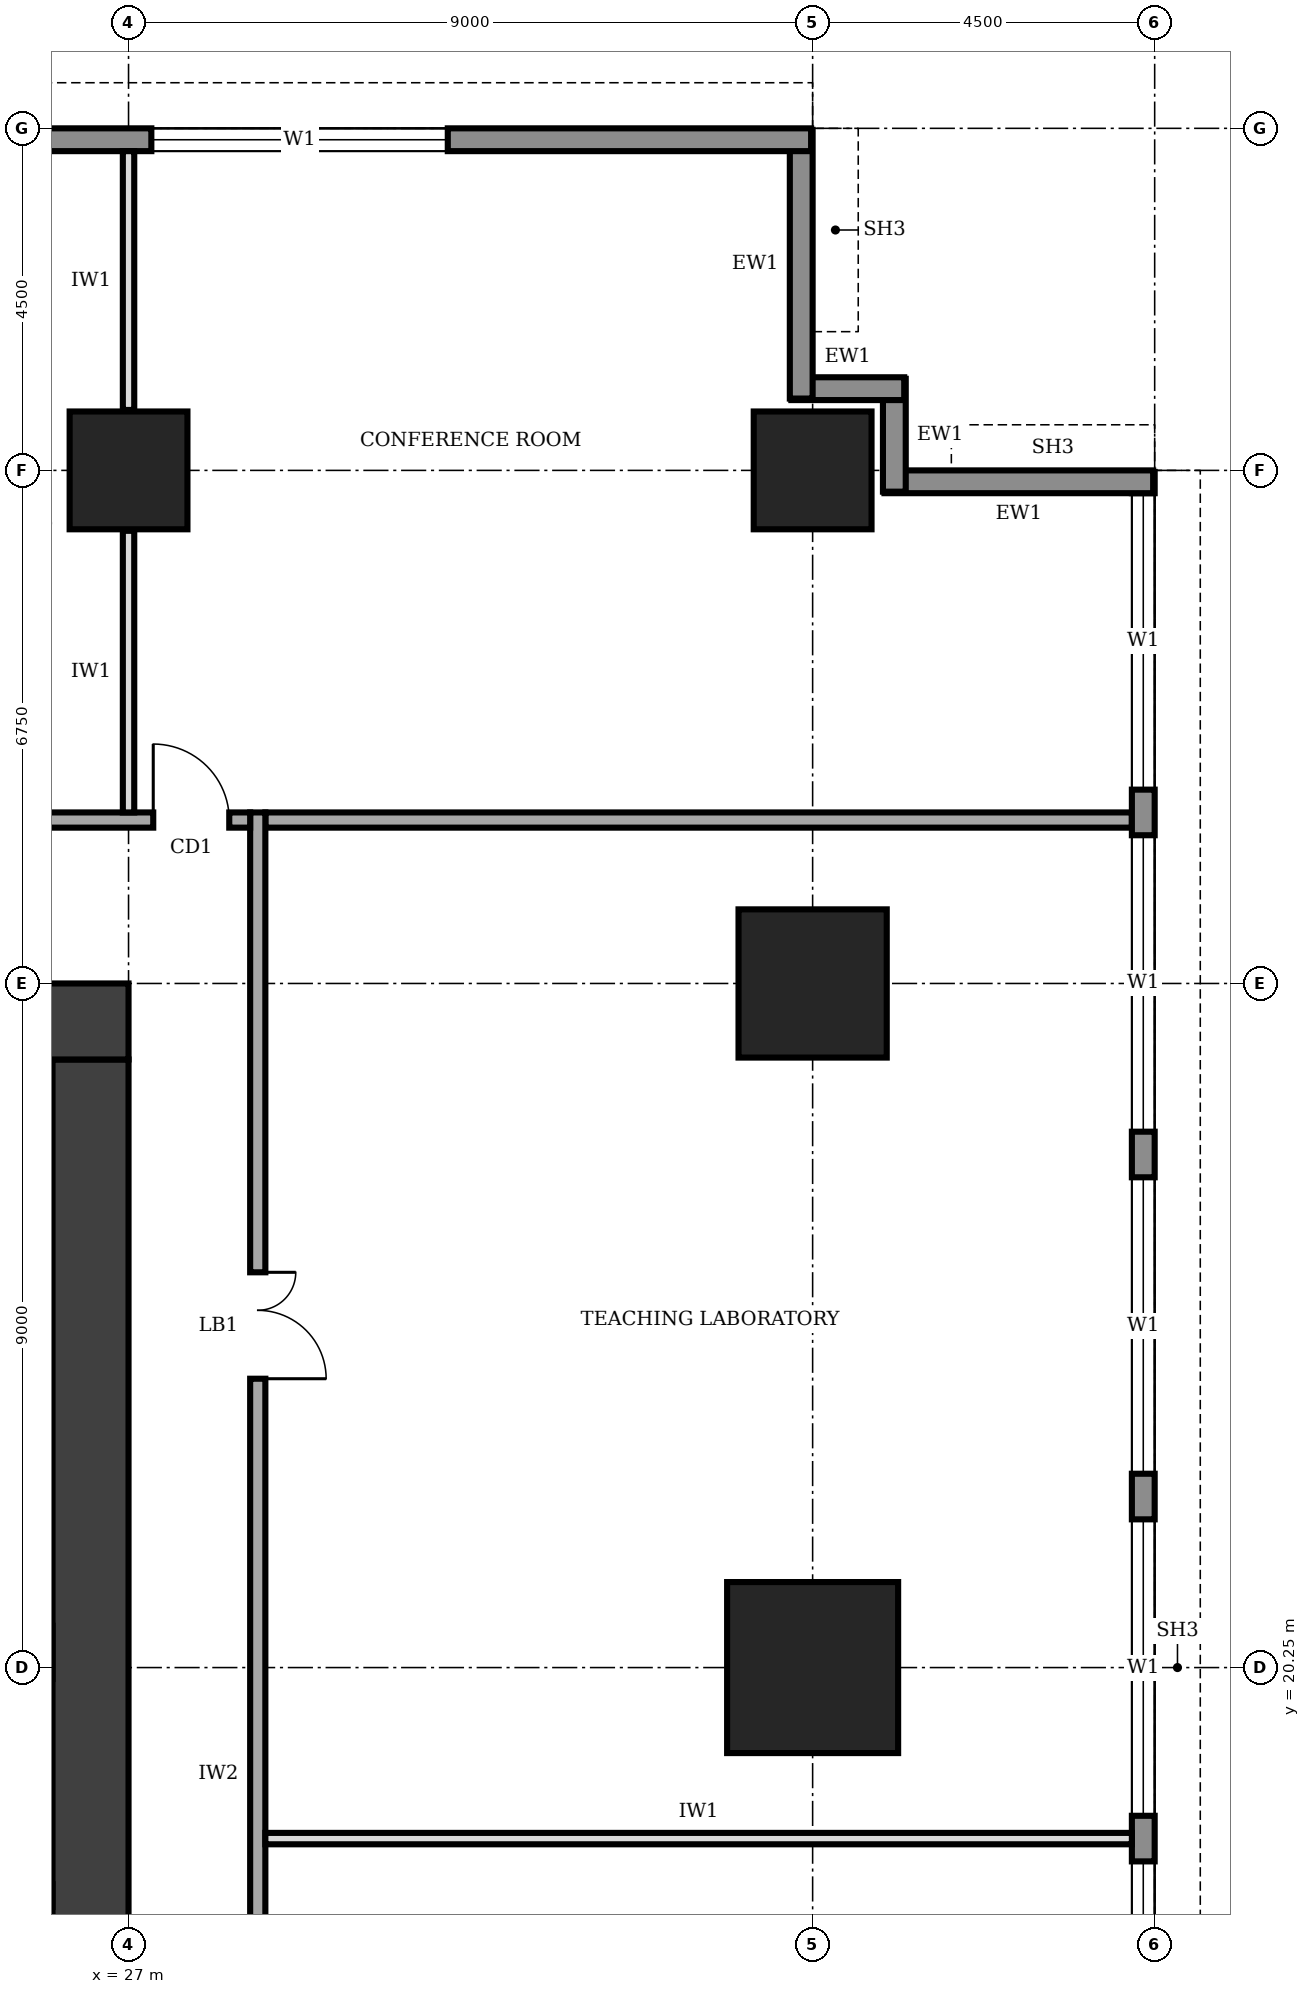
"""IFC4 building model, lengths in metres.
Left out: names, types, materials, properties, quantities, classifications, styles, units other than length and angle.
Written with IfcOpenShell. Run it as: python <this file> out.ifc"""

import sys

from ifc_helpers import new_model, si_unit, direction, frame, frame_2d, origin, origin_2d, place, context, subcontext, project, spatial, rectangle, extrude, element, fill, save


model = new_model("IFC4")
c1 = context("Model", 3, precision=1e-05, world=origin(), true_north=direction((0.0, 1.0)))
c2 = subcontext(c1, "Body", "Model", "MODEL_VIEW")
j1 = project(units=[si_unit("LENGTHUNIT", "METRE"), si_unit("PLANEANGLEUNIT", "RADIAN")], contexts=[c1])
p1 = place(None, origin())
s1 = spatial("IfcSite", under=j1, at=p1, CompositionType="ELEMENT")
p2 = place(p1, origin())
s2 = spatial("IfcBuilding", under=s1, at=p2, CompositionType="ELEMENT")
p3 = place(p2, frame((0.0, 0.0, 205.0)))
s3 = spatial("IfcBuildingStorey", under=s2, at=p3, CompositionType="ELEMENT", Elevation=205.0)
p4 = place(p3, frame((26.5, 12.25, 0.0), z_axis=(0.0, 0.0, 1.0), x_axis=(0.0, 1.0, 0.0)))
e1 = element("IfcWall", 1, at=p4, inside=s3, PredefinedType="SHEAR", context=c2, shape_type="SweptSolid", body=[
    extrude(rectangle(XDim=16.0, YDim=1.0, at=frame_2d((8.0, 0.0))), origin(), (0.0, 0.0, 1.0), 4.0),
])
p5 = place(p3, frame((27.0, 28.75, 0.0), z_axis=(0.0, 0.0, 1.0), x_axis=(-1.0, 0.0, 0.0)))
e2 = element("IfcWall", 2, at=p5, inside=s3, PredefinedType="SHEAR", context=c2, shape_type="SweptSolid", body=[
    extrude(rectangle(XDim=13.5, YDim=1.0, at=frame_2d((6.75, 0.0))), origin(), (0.0, 0.0, 1.0), 4.0),
])
p6 = place(p5, frame((4.75, 0.0, 0.0)))
e3 = element("IfcOpeningElement", 3, at=p6, cuts=e2, PredefinedType="OPENING", context=c2, shape_type="SweptSolid", body=[
    extrude(rectangle(XDim=1.8, YDim=2.1, at=frame_2d((0.9, 1.05))), frame((0.0, 0.51, 0.0), z_axis=(0.0, -1.0, 0.0), x_axis=(1.0, 0.0, 0.0)), (0.0, 0.0, 1.0), 1.02),
])
p7 = place(p3, frame((36.0, 20.25, 0.0), z_axis=(0.0, 0.0, 1.0), x_axis=(1.0, 0.0, 0.0)))
e4 = element("IfcColumn", 4, at=p7, inside=s3, PredefinedType="COLUMN", context=c2, shape_type="SweptSolid", body=[
    extrude(rectangle(XDim=2.25, YDim=2.25, at=origin_2d()), origin(), (0.0, 0.0, 1.0), 4.0),
])
p8 = place(p3, frame((36.0, 29.25, 0.0), z_axis=(0.0, 0.0, 1.0), x_axis=(1.0, 0.0, 0.0)))
e5 = element("IfcColumn", 5, at=p8, inside=s3, PredefinedType="COLUMN", context=c2, shape_type="SweptSolid", body=[
    extrude(rectangle(XDim=1.95, YDim=1.95, at=origin_2d()), origin(), (0.0, 0.0, 1.0), 4.0),
])
for number, where, z_axis, x_axis in (
    (6, (27.0, 36.0, 0.0), (0.0, 0.0, 1.0), (1.0, 0.0, 0.0)),
    (7, (36.0, 36.0, 0.0), (0.0, 0.0, 1.0), (1.0, 0.0, 0.0)),
):
    element("IfcColumn", number, at=place(p3, frame(where, z_axis=z_axis, x_axis=x_axis)), inside=s3, PredefinedType="COLUMN", context=c2, shape_type="SweptSolid", body=[
        extrude(rectangle(XDim=1.55, YDim=1.55, at=origin_2d()), origin(), (0.0, 0.0, 1.0), 4.0),
    ])
p9 = place(p3, frame((40.35, 4.52, 0.0), z_axis=(0.0, 0.0, 1.0), x_axis=(0.0, 1.0, 0.0)))
e8 = element("IfcWall", 8, at=p9, inside=s3, PredefinedType="STANDARD", context=c2, shape_type="SweptSolid", body=[
    extrude(rectangle(XDim=31.46, YDim=0.3, at=frame_2d((15.73, 0.0))), origin(), (0.0, 0.0, 1.0), 3.75),
])
p10 = place(p9, frame((4.78, 0.0, 0.9)))
e9 = element("IfcOpeningElement", 9, at=p10, cuts=e8, PredefinedType="OPENING", context=c2, shape_type="SweptSolid", body=[
    extrude(rectangle(XDim=3.9, YDim=2.2, at=frame_2d((1.95, 1.1))), frame((0.0, 0.16, 0.0), z_axis=(0.0, -1.0, 0.0), x_axis=(1.0, 0.0, 0.0)), (0.0, 0.0, 1.0), 0.32),
])
p11 = place(p9, frame((9.28, 0.0, 0.9)))
e10 = element("IfcOpeningElement", 10, at=p11, cuts=e8, PredefinedType="OPENING", context=c2, shape_type="SweptSolid", body=[
    extrude(rectangle(XDim=3.9, YDim=2.2, at=frame_2d((1.95, 1.1))), frame((0.0, 0.16, 0.0), z_axis=(0.0, -1.0, 0.0), x_axis=(1.0, 0.0, 0.0)), (0.0, 0.0, 1.0), 0.32),
])
p12 = place(p9, frame((13.78, 0.0, 0.9)))
e11 = element("IfcOpeningElement", 11, at=p12, cuts=e8, PredefinedType="OPENING", context=c2, shape_type="SweptSolid", body=[
    extrude(rectangle(XDim=3.9, YDim=2.2, at=frame_2d((1.95, 1.1))), frame((0.0, 0.16, 0.0), z_axis=(0.0, -1.0, 0.0), x_axis=(1.0, 0.0, 0.0)), (0.0, 0.0, 1.0), 0.32),
])
p13 = place(p9, frame((18.28, 0.0, 0.9)))
e12 = element("IfcOpeningElement", 12, at=p13, cuts=e8, PredefinedType="OPENING", context=c2, shape_type="SweptSolid", body=[
    extrude(rectangle(XDim=3.9, YDim=2.2, at=frame_2d((1.95, 1.1))), frame((0.0, 0.16, 0.0), z_axis=(0.0, -1.0, 0.0), x_axis=(1.0, 0.0, 0.0)), (0.0, 0.0, 1.0), 0.32),
])
p14 = place(p9, frame((22.78, 0.0, 0.9)))
e13 = element("IfcOpeningElement", 13, at=p14, cuts=e8, PredefinedType="OPENING", context=c2, shape_type="SweptSolid", body=[
    extrude(rectangle(XDim=3.9, YDim=2.2, at=frame_2d((1.95, 1.1))), frame((0.0, 0.16, 0.0), z_axis=(0.0, -1.0, 0.0), x_axis=(1.0, 0.0, 0.0)), (0.0, 0.0, 1.0), 0.32),
])
p15 = place(p9, frame((27.28, 0.0, 0.9)))
e14 = element("IfcOpeningElement", 14, at=p15, cuts=e8, PredefinedType="OPENING", context=c2, shape_type="SweptSolid", body=[
    extrude(rectangle(XDim=3.9, YDim=2.2, at=frame_2d((1.95, 1.1))), frame((0.0, 0.16, 0.0), z_axis=(0.0, -1.0, 0.0), x_axis=(1.0, 0.0, 0.0)), (0.0, 0.0, 1.0), 0.32),
])
p16 = place(p3, frame((40.48, 35.85, 0.0), z_axis=(0.0, 0.0, 1.0), x_axis=(-1.0, 0.0, 0.0)))
e15 = element("IfcWall", 15, at=p16, inside=s3, PredefinedType="STANDARD", context=c2, shape_type="SweptSolid", body=[
    extrude(rectangle(XDim=3.535, YDim=0.3, at=frame_2d((1.768, 0.0))), origin(), (0.0, 0.0, 1.0), 2.85),
])
for number, where, z_axis, x_axis in (
    (16, (37.075, 35.72, 0.0), (0.0, 0.0, 1.0), (0.0, 1.0, 0.0)),
    (17, (37.205, 37.075, 0.0), (0.0, 0.0, 1.0), (-1.0, 0.0, 0.0)),
):
    element("IfcWall", number, at=place(p3, frame(where, z_axis=z_axis, x_axis=x_axis)), inside=s3, PredefinedType="STANDARD", context=c2, shape_type="SweptSolid", body=[
        extrude(rectangle(XDim=1.485, YDim=0.3, at=frame_2d((0.743, 0.0))), origin(), (0.0, 0.0, 1.0), 3.75),
    ])
p17 = place(p3, frame((35.85, 36.945, 0.0), z_axis=(0.0, 0.0, 1.0), x_axis=(0.0, 1.0, 0.0)))
e18 = element("IfcWall", 18, at=p17, inside=s3, PredefinedType="STANDARD", context=c2, shape_type="SweptSolid", body=[
    extrude(rectangle(XDim=3.535, YDim=0.3, at=frame_2d((1.768, 0.0))), origin(), (0.0, 0.0, 1.0), 2.85),
])
p18 = place(p3, frame((35.98, 40.35, 0.0), z_axis=(0.0, 0.0, 1.0), x_axis=(-1.0, 0.0, 0.0)))
e19 = element("IfcWall", 19, at=p18, inside=s3, PredefinedType="STANDARD", context=c2, shape_type="SweptSolid", body=[
    extrude(rectangle(XDim=31.46, YDim=0.3, at=frame_2d((15.73, 0.0))), origin(), (0.0, 0.0, 1.0), 3.75),
])
p19 = place(p18, frame((27.28, 0.0, 0.9)))
e20 = element("IfcOpeningElement", 20, at=p19, cuts=e19, PredefinedType="OPENING", context=c2, shape_type="SweptSolid", body=[
    extrude(rectangle(XDim=3.9, YDim=2.2, at=frame_2d((1.95, 1.1))), frame((0.0, 0.16, 0.0), z_axis=(0.0, -1.0, 0.0), x_axis=(1.0, 0.0, 0.0)), (0.0, 0.0, 1.0), 0.32),
])
p20 = place(p18, frame((22.78, 0.0, 0.9)))
e21 = element("IfcOpeningElement", 21, at=p20, cuts=e19, PredefinedType="OPENING", context=c2, shape_type="SweptSolid", body=[
    extrude(rectangle(XDim=3.9, YDim=2.2, at=frame_2d((1.95, 1.1))), frame((0.0, 0.16, 0.0), z_axis=(0.0, -1.0, 0.0), x_axis=(1.0, 0.0, 0.0)), (0.0, 0.0, 1.0), 0.32),
])
p21 = place(p18, frame((4.78, 0.0, 0.9)))
e22 = element("IfcOpeningElement", 22, at=p21, cuts=e19, PredefinedType="OPENING", context=c2, shape_type="SweptSolid", body=[
    extrude(rectangle(XDim=3.9, YDim=2.2, at=frame_2d((1.95, 1.1))), frame((0.0, 0.16, 0.0), z_axis=(0.0, -1.0, 0.0), x_axis=(1.0, 0.0, 0.0)), (0.0, 0.0, 1.0), 0.32),
])
p22 = place(p3, frame((28.7, 7.7, 0.0), z_axis=(0.0, 0.0, 1.0), x_axis=(0.0, 1.0, 0.0)))
e23 = element("IfcWall", 23, at=p22, inside=s3, PredefinedType="SOLIDWALL", context=c2, shape_type="SweptSolid", body=[
    extrude(rectangle(XDim=23.8, YDim=0.2, at=frame_2d((11.9, 0.0))), origin(), (0.0, 0.0, 1.0), 3.75),
])
p23 = place(p22, frame((4.15, 0.0, 0.0)))
e24 = element("IfcOpeningElement", 24, at=p23, cuts=e23, PredefinedType="OPENING", context=c2, shape_type="SweptSolid", body=[
    extrude(rectangle(XDim=1.8, YDim=2.1, at=frame_2d((0.9, 1.05))), frame((0.0, 0.11, 0.0), z_axis=(0.0, -1.0, 0.0), x_axis=(1.0, 0.0, 0.0)), (0.0, 0.0, 1.0), 0.22),
])
p24 = place(p22, frame((16.35, 0.0, 0.0)))
e25 = element("IfcOpeningElement", 25, at=p24, cuts=e23, PredefinedType="OPENING", context=c2, shape_type="SweptSolid", body=[
    extrude(rectangle(XDim=1.4, YDim=2.1, at=frame_2d((0.7, 1.05))), frame((0.0, 0.11, 0.0), z_axis=(0.0, -1.0, 0.0), x_axis=(1.0, 0.0, 0.0)), (0.0, 0.0, 1.0), 0.22),
])
p25 = place(p3, frame((28.6, 31.4, 0.0), z_axis=(0.0, 0.0, 1.0), x_axis=(-1.0, 0.0, 0.0)))
e26 = element("IfcWall", 26, at=p25, inside=s3, PredefinedType="SOLIDWALL", context=c2, shape_type="SweptSolid", body=[
    extrude(rectangle(XDim=16.9, YDim=0.2, at=frame_2d((8.45, 0.0))), origin(), (0.0, 0.0, 1.0), 3.75),
])
p26 = place(p25, frame((15.425, 0.0, 0.0)))
e27 = element("IfcOpeningElement", 27, at=p26, cuts=e26, PredefinedType="OPENING", context=c2, shape_type="SweptSolid", body=[
    extrude(rectangle(XDim=1.0, YDim=2.1, at=frame_2d((0.5, 1.05))), frame((0.0, 0.11, 0.0), z_axis=(0.0, -1.0, 0.0), x_axis=(1.0, 0.0, 0.0)), (0.0, 0.0, 1.0), 0.22),
])
p27 = place(p25, frame((12.35, 0.0, 0.0)))
e28 = element("IfcOpeningElement", 28, at=p27, cuts=e26, PredefinedType="OPENING", context=c2, shape_type="SweptSolid", body=[
    extrude(rectangle(XDim=1.0, YDim=2.1, at=frame_2d((0.5, 1.05))), frame((0.0, 0.11, 0.0), z_axis=(0.0, -1.0, 0.0), x_axis=(1.0, 0.0, 0.0)), (0.0, 0.0, 1.0), 0.22),
])
p28 = place(p25, frame((5.6, 0.0, 0.0)))
e29 = element("IfcOpeningElement", 29, at=p28, cuts=e26, PredefinedType="OPENING", context=c2, shape_type="SweptSolid", body=[
    extrude(rectangle(XDim=1.0, YDim=2.1, at=frame_2d((0.5, 1.05))), frame((0.0, 0.11, 0.0), z_axis=(0.0, -1.0, 0.0), x_axis=(1.0, 0.0, 0.0)), (0.0, 0.0, 1.0), 0.22),
])
p29 = place(p25, frame((0.275, 0.0, 0.0)))
e30 = element("IfcOpeningElement", 30, at=p29, cuts=e26, PredefinedType="OPENING", context=c2, shape_type="SweptSolid", body=[
    extrude(rectangle(XDim=1.0, YDim=2.1, at=frame_2d((0.5, 1.05))), frame((0.0, 0.11, 0.0), z_axis=(0.0, -1.0, 0.0), x_axis=(1.0, 0.0, 0.0)), (0.0, 0.0, 1.0), 0.22),
])
p30 = place(p3, frame((28.8, 31.4, 0.0), z_axis=(0.0, 0.0, 1.0), x_axis=(1.0, 0.0, 0.0)))
e31 = element("IfcWall", 31, at=p30, inside=s3, PredefinedType="SOLIDWALL", context=c2, shape_type="SweptSolid", body=[
    extrude(rectangle(XDim=11.4, YDim=0.2, at=frame_2d((5.7, 0.0))), origin(), (0.0, 0.0, 1.0), 3.75),
])
p31 = place(p3, frame((27.0, 31.5, 0.0), z_axis=(0.0, 0.0, 1.0), x_axis=(0.0, 1.0, 0.0)))
e32 = element("IfcWall", 32, at=p31, inside=s3, PredefinedType="PARTITIONING", context=c2, shape_type="SweptSolid", body=[
    extrude(rectangle(XDim=3.705, YDim=0.15, at=frame_2d((1.853, 0.0))), origin(), (0.0, 0.0, 1.0), 2.85),
])
p32 = place(p3, frame((27.0, 36.795, 0.0), z_axis=(0.0, 0.0, 1.0), x_axis=(0.0, 1.0, 0.0)))
e33 = element("IfcWall", 33, at=p32, inside=s3, PredefinedType="PARTITIONING", context=c2, shape_type="SweptSolid", body=[
    extrude(rectangle(XDim=3.405, YDim=0.15, at=frame_2d((1.703, 0.0))), origin(), (0.0, 0.0, 1.0), 2.85),
])
p33 = place(p3, frame((28.8, 18.0, 0.0), z_axis=(0.0, 0.0, 1.0), x_axis=(1.0, 0.0, 0.0)))
e34 = element("IfcWall", 34, at=p33, inside=s3, PredefinedType="PARTITIONING", context=c2, shape_type="SweptSolid", body=[
    extrude(rectangle(XDim=11.4, YDim=0.15, at=frame_2d((5.7, 0.0))), origin(), (0.0, 0.0, 1.0), 3.75),
])
p34 = place(p11, origin())
e35 = element("IfcWindow", 35, at=p34, inside=s3, PartitioningType="SINGLE_PANEL", PredefinedType="WINDOW", context=c2, shape_type="SweptSolid", body=[
    extrude(rectangle(XDim=3.9, YDim=2.2, at=frame_2d((1.95, 1.1))), frame((0.0, 0.03, 0.0), z_axis=(0.0, -1.0, 0.0), x_axis=(1.0, 0.0, 0.0)), (0.0, 0.0, 1.0), 0.06),
])
fill(e10, e35)
p35 = place(p12, origin())
e36 = element("IfcWindow", 36, at=p35, inside=s3, PartitioningType="SINGLE_PANEL", PredefinedType="WINDOW", context=c2, shape_type="SweptSolid", body=[
    extrude(rectangle(XDim=3.9, YDim=2.2, at=frame_2d((1.95, 1.1))), frame((0.0, 0.03, 0.0), z_axis=(0.0, -1.0, 0.0), x_axis=(1.0, 0.0, 0.0)), (0.0, 0.0, 1.0), 0.06),
])
fill(e11, e36)
p36 = place(p13, origin())
e37 = element("IfcWindow", 37, at=p36, inside=s3, PartitioningType="SINGLE_PANEL", PredefinedType="WINDOW", context=c2, shape_type="SweptSolid", body=[
    extrude(rectangle(XDim=3.9, YDim=2.2, at=frame_2d((1.95, 1.1))), frame((0.0, 0.03, 0.0), z_axis=(0.0, -1.0, 0.0), x_axis=(1.0, 0.0, 0.0)), (0.0, 0.0, 1.0), 0.06),
])
fill(e12, e37)
p37 = place(p14, origin())
e38 = element("IfcWindow", 38, at=p37, inside=s3, PartitioningType="SINGLE_PANEL", PredefinedType="WINDOW", context=c2, shape_type="SweptSolid", body=[
    extrude(rectangle(XDim=3.9, YDim=2.2, at=frame_2d((1.95, 1.1))), frame((0.0, 0.03, 0.0), z_axis=(0.0, -1.0, 0.0), x_axis=(1.0, 0.0, 0.0)), (0.0, 0.0, 1.0), 0.06),
])
fill(e13, e38)
p38 = place(p15, origin())
e39 = element("IfcWindow", 39, at=p38, inside=s3, PartitioningType="SINGLE_PANEL", PredefinedType="WINDOW", context=c2, shape_type="SweptSolid", body=[
    extrude(rectangle(XDim=3.9, YDim=2.2, at=frame_2d((1.95, 1.1))), frame((0.0, 0.03, 0.0), z_axis=(0.0, -1.0, 0.0), x_axis=(1.0, 0.0, 0.0)), (0.0, 0.0, 1.0), 0.06),
])
fill(e14, e39)
p39 = place(p21, origin())
e40 = element("IfcWindow", 40, at=p39, inside=s3, PartitioningType="SINGLE_PANEL", PredefinedType="WINDOW", context=c2, shape_type="SweptSolid", body=[
    extrude(rectangle(XDim=3.9, YDim=2.2, at=frame_2d((1.95, 1.1))), frame((0.0, 0.03, 0.0), z_axis=(0.0, -1.0, 0.0), x_axis=(1.0, 0.0, 0.0)), (0.0, 0.0, 1.0), 0.06),
])
fill(e22, e40)
p40 = place(p24, frame((1.4, 0.0, 0.0), z_axis=(0.0, 0.0, 1.0), x_axis=(-1.0, 0.0, 0.0)))
e41 = element("IfcDoor", 41, at=p40, inside=s3, OperationType="DOUBLE_DOOR_SINGLE_SWING", PredefinedType="DOOR", context=c2, shape_type="SweptSolid", body=[
    extrude(rectangle(XDim=1.4, YDim=2.1, at=frame_2d((0.7, 1.05))), frame((0.0, 0.025, 0.0), z_axis=(0.0, -1.0, 0.0), x_axis=(1.0, 0.0, 0.0)), (0.0, 0.0, 1.0), 0.05),
])
fill(e25, e41)
p41 = place(p29, frame((1.0, 0.0, 0.0), z_axis=(0.0, 0.0, 1.0), x_axis=(-1.0, 0.0, 0.0)))
e42 = element("IfcDoor", 42, at=p41, inside=s3, OperationType="SINGLE_SWING_LEFT", PredefinedType="DOOR", context=c2, shape_type="SweptSolid", body=[
    extrude(rectangle(XDim=1.0, YDim=2.1, at=frame_2d((0.5, 1.05))), frame((0.0, 0.025, 0.0), z_axis=(0.0, -1.0, 0.0), x_axis=(1.0, 0.0, 0.0)), (0.0, 0.0, 1.0), 0.05),
])
fill(e30, e42)
save(model, sys.argv[1])
